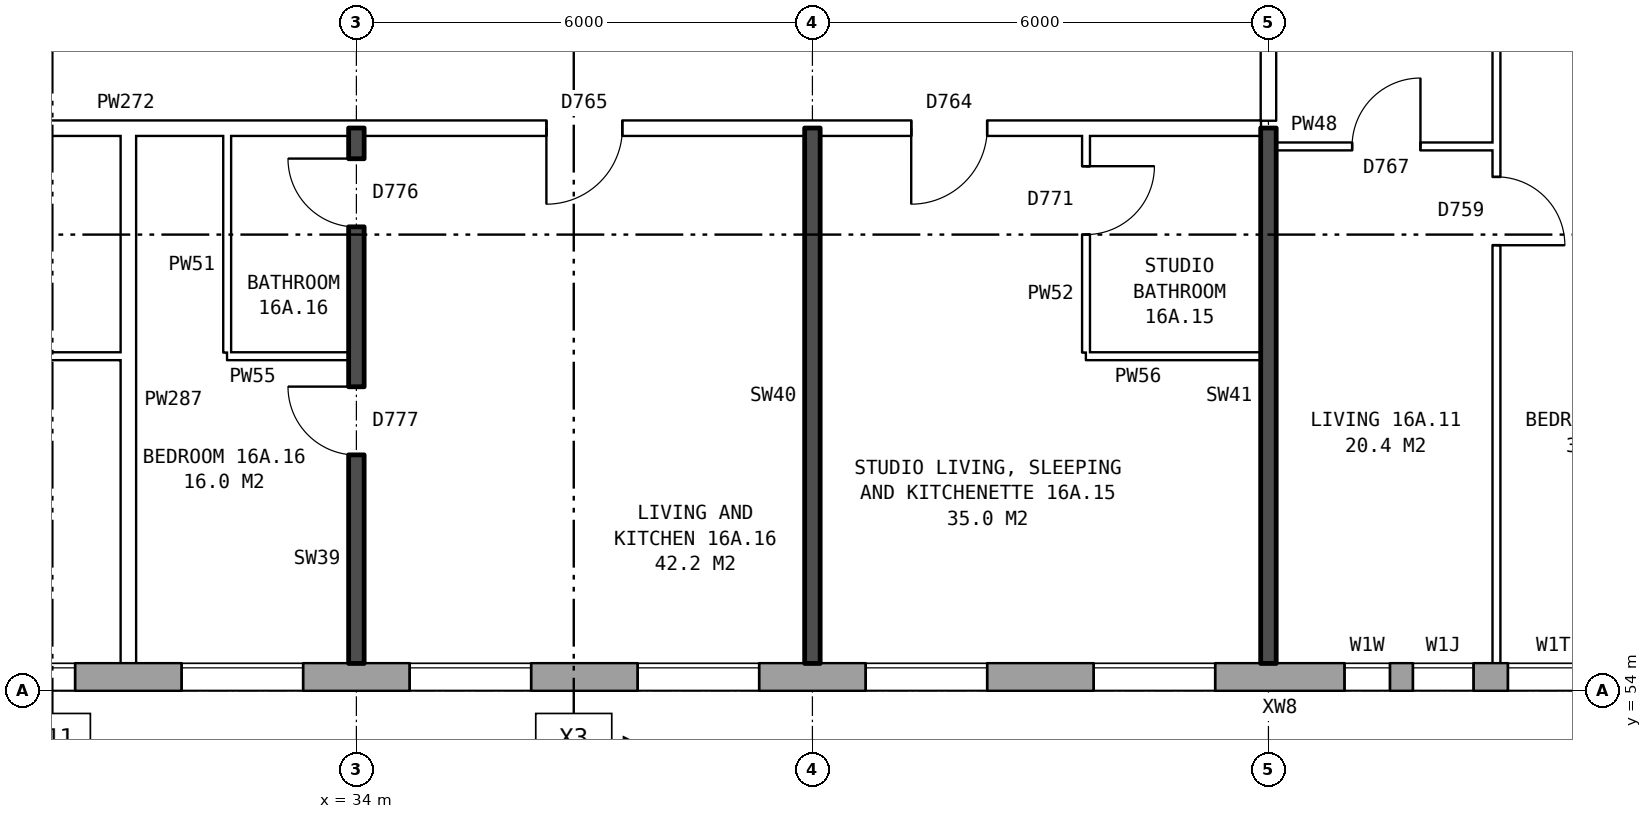
"""IFC4 building model, lengths in metres.
Left out: names, types, materials, properties, quantities, classifications, styles, units other than length and angle.
Written with IfcOpenShell. Run it as: python <this file> out.ifc"""

import sys

from ifc_helpers import new_model, si_unit, direction, frame, frame_2d, origin, place, context, subcontext, project, spatial, rectangle, extrude, element, fill, save


model = new_model("IFC4")
c1 = context("Model", 3, precision=1e-05, world=origin(), true_north=direction((0.0, 1.0)))
c2 = subcontext(c1, "Body", "Model", "MODEL_VIEW")
j1 = project(units=[si_unit("LENGTHUNIT", "METRE"), si_unit("PLANEANGLEUNIT", "RADIAN")], contexts=[c1])
p1 = place(None, origin())
s1 = spatial("IfcSite", under=j1, at=p1, CompositionType="ELEMENT")
p2 = place(p1, origin())
s2 = spatial("IfcBuilding", under=s1, at=p2, CompositionType="ELEMENT")
p3 = place(p2, frame((0.0, 0.0, 59.8)))
s3 = spatial("IfcBuildingStorey", under=s2, at=p3, CompositionType="ELEMENT", Elevation=59.8)
p4 = place(p3, frame((24.575, 54.18, 0.0), z_axis=(0.0, 0.0, 1.0), x_axis=(1.0, 0.0, 0.0)))
e1 = element("IfcWall", 1, at=p4, inside=s3, PredefinedType="STANDARD", context=c2, shape_type="SweptSolid", body=[
    extrude(rectangle(XDim=48.351, YDim=0.36, at=frame_2d((24.175, 0.0))), origin(), (0.0, 0.0, 1.0), 2.85),
])
p5 = place(p4, frame((1.125, 0.0, 0.8)))
e2 = element("IfcOpeningElement", 2, at=p5, cuts=e1, PredefinedType="OPENING", context=c2, shape_type="SweptSolid", body=[
    extrude(rectangle(XDim=1.6, YDim=1.8, at=frame_2d((0.8, 0.9))), frame((0.0, 0.19, 0.0), z_axis=(0.0, -1.0, 0.0), x_axis=(1.0, 0.0, 0.0)), (0.0, 0.0, 1.0), 0.38),
])
p6 = place(p4, frame((4.125, 0.0, 0.8)))
e3 = element("IfcOpeningElement", 3, at=p6, cuts=e1, PredefinedType="OPENING", context=c2, shape_type="SweptSolid", body=[
    extrude(rectangle(XDim=1.6, YDim=1.8, at=frame_2d((0.8, 0.9))), frame((0.0, 0.19, 0.0), z_axis=(0.0, -1.0, 0.0), x_axis=(1.0, 0.0, 0.0)), (0.0, 0.0, 1.0), 0.38),
])
p7 = place(p4, frame((7.125, 0.0, 0.8)))
e4 = element("IfcOpeningElement", 4, at=p7, cuts=e1, PredefinedType="OPENING", context=c2, shape_type="SweptSolid", body=[
    extrude(rectangle(XDim=1.6, YDim=1.8, at=frame_2d((0.8, 0.9))), frame((0.0, 0.19, 0.0), z_axis=(0.0, -1.0, 0.0), x_axis=(1.0, 0.0, 0.0)), (0.0, 0.0, 1.0), 0.38),
])
p8 = place(p4, frame((10.125, 0.0, 0.8)))
e5 = element("IfcOpeningElement", 5, at=p8, cuts=e1, PredefinedType="OPENING", context=c2, shape_type="SweptSolid", body=[
    extrude(rectangle(XDim=1.6, YDim=1.8, at=frame_2d((0.8, 0.9))), frame((0.0, 0.19, 0.0), z_axis=(0.0, -1.0, 0.0), x_axis=(1.0, 0.0, 0.0)), (0.0, 0.0, 1.0), 0.38),
])
p9 = place(p4, frame((13.125, 0.0, 0.8)))
e6 = element("IfcOpeningElement", 6, at=p9, cuts=e1, PredefinedType="OPENING", context=c2, shape_type="SweptSolid", body=[
    extrude(rectangle(XDim=1.6, YDim=1.8, at=frame_2d((0.8, 0.9))), frame((0.0, 0.19, 0.0), z_axis=(0.0, -1.0, 0.0), x_axis=(1.0, 0.0, 0.0)), (0.0, 0.0, 1.0), 0.38),
])
p10 = place(p4, frame((16.125, 0.0, 0.8)))
e7 = element("IfcOpeningElement", 7, at=p10, cuts=e1, PredefinedType="OPENING", context=c2, shape_type="SweptSolid", body=[
    extrude(rectangle(XDim=1.6, YDim=1.8, at=frame_2d((0.8, 0.9))), frame((0.0, 0.19, 0.0), z_axis=(0.0, -1.0, 0.0), x_axis=(1.0, 0.0, 0.0)), (0.0, 0.0, 1.0), 0.38),
])
p11 = place(p4, frame((19.125, 0.0, 0.8)))
e8 = element("IfcOpeningElement", 8, at=p11, cuts=e1, PredefinedType="OPENING", context=c2, shape_type="SweptSolid", body=[
    extrude(rectangle(XDim=1.6, YDim=1.8, at=frame_2d((0.8, 0.9))), frame((0.0, 0.19, 0.0), z_axis=(0.0, -1.0, 0.0), x_axis=(1.0, 0.0, 0.0)), (0.0, 0.0, 1.0), 0.38),
])
p12 = place(p4, frame((22.425, 0.0, 0.15)))
e9 = element("IfcOpeningElement", 9, at=p12, cuts=e1, PredefinedType="OPENING", context=c2, shape_type="SweptSolid", body=[
    extrude(rectangle(XDim=0.6, YDim=0.9, at=frame_2d((0.3, 0.45))), frame((0.0, 0.19, 0.0), z_axis=(0.0, -1.0, 0.0), x_axis=(1.0, 0.0, 0.0)), (0.0, 0.0, 1.0), 0.38),
])
p13 = place(p4, frame((24.575, 0.0, 0.25)))
e10 = element("IfcOpeningElement", 10, at=p13, cuts=e1, PredefinedType="OPENING", context=c2, shape_type="SweptSolid", body=[
    extrude(rectangle(XDim=1.2, YDim=0.9, at=frame_2d((0.6, 0.45))), frame((0.0, 0.19, 0.0), z_axis=(0.0, -1.0, 0.0), x_axis=(1.0, 0.0, 0.0)), (0.0, 0.0, 1.0), 0.38),
])
p14 = place(p4, frame((28.125, 0.0, 0.8)))
e11 = element("IfcOpeningElement", 11, at=p14, cuts=e1, PredefinedType="OPENING", context=c2, shape_type="SweptSolid", body=[
    extrude(rectangle(XDim=1.6, YDim=1.8, at=frame_2d((0.8, 0.9))), frame((0.0, 0.19, 0.0), z_axis=(0.0, -1.0, 0.0), x_axis=(1.0, 0.0, 0.0)), (0.0, 0.0, 1.0), 0.38),
])
p15 = place(p4, frame((31.125, 0.0, 0.8)))
e12 = element("IfcOpeningElement", 12, at=p15, cuts=e1, PredefinedType="OPENING", context=c2, shape_type="SweptSolid", body=[
    extrude(rectangle(XDim=1.6, YDim=1.8, at=frame_2d((0.8, 0.9))), frame((0.0, 0.19, 0.0), z_axis=(0.0, -1.0, 0.0), x_axis=(1.0, 0.0, 0.0)), (0.0, 0.0, 1.0), 0.38),
])
p16 = place(p4, frame((34.125, 0.0, 0.8)))
e13 = element("IfcOpeningElement", 13, at=p16, cuts=e1, PredefinedType="OPENING", context=c2, shape_type="SweptSolid", body=[
    extrude(rectangle(XDim=1.6, YDim=1.8, at=frame_2d((0.8, 0.9))), frame((0.0, 0.19, 0.0), z_axis=(0.0, -1.0, 0.0), x_axis=(1.0, 0.0, 0.0)), (0.0, 0.0, 1.0), 0.38),
])
p17 = place(p4, frame((37.125, 0.0, 0.8)))
e14 = element("IfcOpeningElement", 14, at=p17, cuts=e1, PredefinedType="OPENING", context=c2, shape_type="SweptSolid", body=[
    extrude(rectangle(XDim=1.6, YDim=1.8, at=frame_2d((0.8, 0.9))), frame((0.0, 0.19, 0.0), z_axis=(0.0, -1.0, 0.0), x_axis=(1.0, 0.0, 0.0)), (0.0, 0.0, 1.0), 0.38),
])
p18 = place(p4, frame((40.125, 0.0, 0.8)))
e15 = element("IfcOpeningElement", 15, at=p18, cuts=e1, PredefinedType="OPENING", context=c2, shape_type="SweptSolid", body=[
    extrude(rectangle(XDim=1.6, YDim=1.8, at=frame_2d((0.8, 0.9))), frame((0.0, 0.19, 0.0), z_axis=(0.0, -1.0, 0.0), x_axis=(1.0, 0.0, 0.0)), (0.0, 0.0, 1.0), 0.38),
])
p19 = place(p4, frame((43.125, 0.0, 0.8)))
e16 = element("IfcOpeningElement", 16, at=p19, cuts=e1, PredefinedType="OPENING", context=c2, shape_type="SweptSolid", body=[
    extrude(rectangle(XDim=1.6, YDim=1.8, at=frame_2d((0.8, 0.9))), frame((0.0, 0.19, 0.0), z_axis=(0.0, -1.0, 0.0), x_axis=(1.0, 0.0, 0.0)), (0.0, 0.0, 1.0), 0.38),
])
p20 = place(p4, frame((46.125, 0.0, 0.8)))
e17 = element("IfcOpeningElement", 17, at=p20, cuts=e1, PredefinedType="OPENING", context=c2, shape_type="SweptSolid", body=[
    extrude(rectangle(XDim=1.6, YDim=1.8, at=frame_2d((0.8, 0.9))), frame((0.0, 0.19, 0.0), z_axis=(0.0, -1.0, 0.0), x_axis=(1.0, 0.0, 0.0)), (0.0, 0.0, 1.0), 0.38),
])
p21 = place(p4, frame((23.325, 0.0, 0.15)))
e18 = element("IfcOpeningElement", 18, at=p21, cuts=e1, PredefinedType="OPENING", context=c2, shape_type="SweptSolid", body=[
    extrude(rectangle(XDim=0.8, YDim=1.5, at=frame_2d((0.4, 0.75))), frame((0.0, 0.19, 0.0), z_axis=(0.0, -1.0, 0.0), x_axis=(1.0, 0.0, 0.0)), (0.0, 0.0, 1.0), 0.38),
])
p22 = place(p4, frame((26.425, 0.0, 1.65)))
e19 = element("IfcOpeningElement", 19, at=p22, cuts=e1, PredefinedType="OPENING", context=c2, shape_type="SweptSolid", body=[
    extrude(rectangle(XDim=0.8, YDim=0.9, at=frame_2d((0.4, 0.45))), frame((0.0, 0.19, 0.0), z_axis=(0.0, -1.0, 0.0), x_axis=(1.0, 0.0, 0.0)), (0.0, 0.0, 1.0), 0.38),
])
p23 = place(p3, frame((28.1, 58.4, 0.0), z_axis=(0.0, 0.0, 1.0), x_axis=(1.0, 0.0, 0.0)))
e20 = element("IfcWall", 20, at=p23, inside=s3, PredefinedType="PARTITIONING", context=c2, shape_type="SweptSolid", body=[
    extrude(rectangle(XDim=2.8, YDim=0.1, at=frame_2d((1.4, 0.0))), origin(), (0.0, 0.0, 1.0), 2.85),
])
p24 = place(p3, frame((32.3, 58.4, 0.0), z_axis=(0.0, 0.0, 1.0), x_axis=(1.0, 0.0, 0.0)))
e21 = element("IfcWall", 21, at=p24, inside=s3, PredefinedType="PARTITIONING", context=c2, shape_type="SweptSolid", body=[
    extrude(rectangle(XDim=1.6, YDim=0.1, at=frame_2d((0.8, 0.0))), origin(), (0.0, 0.0, 1.0), 2.85),
])
p25 = place(p3, frame((43.6, 58.4, 0.0), z_axis=(0.0, 0.0, 1.0), x_axis=(1.0, 0.0, 0.0)))
e22 = element("IfcWall", 22, at=p25, inside=s3, PredefinedType="PARTITIONING", context=c2, shape_type="SweptSolid", body=[
    extrude(rectangle(XDim=2.3, YDim=0.1, at=frame_2d((1.15, 0.0))), origin(), (0.0, 0.0, 1.0), 2.85),
])
p26 = place(p3, frame((46.1, 61.16, 0.0), z_axis=(0.0, 0.0, 1.0), x_axis=(1.0, 0.0, 0.0)))
e23 = element("IfcWall", 23, at=p26, inside=s3, PredefinedType="PARTITIONING", context=c2, shape_type="SweptSolid", body=[
    extrude(rectangle(XDim=2.9, YDim=0.1, at=frame_2d((1.45, 0.0))), origin(), (0.0, 0.0, 1.0), 2.85),
])
p27 = place(p26, frame((1.0, 0.0, 0.0)))
e24 = element("IfcOpeningElement", 24, at=p27, cuts=e23, PredefinedType="OPENING", context=c2, shape_type="SweptSolid", body=[
    extrude(rectangle(XDim=0.9, YDim=2.1, at=frame_2d((0.45, 1.05))), frame((0.0, 0.06, 0.0), z_axis=(0.0, -1.0, 0.0), x_axis=(1.0, 0.0, 0.0)), (0.0, 0.0, 1.0), 0.12),
])
p28 = place(p3, frame((21.86, 61.4, 0.0), z_axis=(0.0, 0.0, 1.0), x_axis=(1.0, 0.0, 0.0)))
e25 = element("IfcWall", 25, at=p28, inside=s3, PredefinedType="PARTITIONING", context=c2, shape_type="SweptSolid", body=[
    extrude(rectangle(XDim=24.04, YDim=0.2, at=frame_2d((12.02, 0.0))), origin(), (0.0, 0.0, 1.0), 2.85),
])
p29 = place(p28, frame((19.44, 0.0, 0.0)))
e26 = element("IfcOpeningElement", 26, at=p29, cuts=e25, PredefinedType="OPENING", context=c2, shape_type="SweptSolid", body=[
    extrude(rectangle(XDim=1.0, YDim=2.1, at=frame_2d((0.5, 1.05))), frame((0.0, 0.11, 0.0), z_axis=(0.0, -1.0, 0.0), x_axis=(1.0, 0.0, 0.0)), (0.0, 0.0, 1.0), 0.22),
])
p30 = place(p28, frame((14.64, 0.0, 0.0)))
e27 = element("IfcOpeningElement", 27, at=p30, cuts=e25, PredefinedType="OPENING", context=c2, shape_type="SweptSolid", body=[
    extrude(rectangle(XDim=1.0, YDim=2.1, at=frame_2d((0.5, 1.05))), frame((0.0, 0.11, 0.0), z_axis=(0.0, -1.0, 0.0), x_axis=(1.0, 0.0, 0.0)), (0.0, 0.0, 1.0), 0.22),
])
p31 = place(p28, frame((2.57, 0.0, 0.0)))
e28 = element("IfcOpeningElement", 28, at=p31, cuts=e25, PredefinedType="OPENING", context=c2, shape_type="SweptSolid", body=[
    extrude(rectangle(XDim=1.0, YDim=2.1, at=frame_2d((0.5, 1.05))), frame((0.0, 0.11, 0.0), z_axis=(0.0, -1.0, 0.0), x_axis=(1.0, 0.0, 0.0)), (0.0, 0.0, 1.0), 0.22),
])
p32 = place(p3, frame((31.0, 54.36, 0.0), z_axis=(0.0, 0.0, 1.0), x_axis=(0.0, 1.0, 0.0)))
e29 = element("IfcWall", 29, at=p32, inside=s3, PredefinedType="PARTITIONING", context=c2, shape_type="SweptSolid", body=[
    extrude(rectangle(XDim=6.94, YDim=0.2, at=frame_2d((3.47, 0.0))), origin(), (0.0, 0.0, 1.0), 2.85),
])
p33 = place(p3, frame((32.3, 58.45, 0.0), z_axis=(0.0, 0.0, 1.0), x_axis=(0.0, 1.0, 0.0)))
e30 = element("IfcWall", 30, at=p33, inside=s3, PredefinedType="PARTITIONING", context=c2, shape_type="SweptSolid", body=[
    extrude(rectangle(XDim=2.85, YDim=0.1, at=frame_2d((1.425, 0.0))), origin(), (0.0, 0.0, 1.0), 2.85),
])
p34 = place(p3, frame((34.0, 54.36, 0.0), z_axis=(0.0, 0.0, 1.0), x_axis=(0.0, 1.0, 0.0)))
e31 = element("IfcWall", 31, at=p34, inside=s3, PredefinedType="SOLIDWALL", context=c2, shape_type="SweptSolid", body=[
    extrude(rectangle(XDim=7.04, YDim=0.2, at=frame_2d((3.52, 0.0))), origin(), (0.0, 0.0, 1.0), 2.85),
])
p35 = place(p34, frame((2.74, 0.0, 0.0)))
e32 = element("IfcOpeningElement", 32, at=p35, cuts=e31, PredefinedType="OPENING", context=c2, shape_type="SweptSolid", body=[
    extrude(rectangle(XDim=0.9, YDim=2.1, at=frame_2d((0.45, 1.05))), frame((0.0, 0.11, 0.0), z_axis=(0.0, -1.0, 0.0), x_axis=(1.0, 0.0, 0.0)), (0.0, 0.0, 1.0), 0.22),
])
p36 = place(p34, frame((5.74, 0.0, 0.0)))
e33 = element("IfcOpeningElement", 33, at=p36, cuts=e31, PredefinedType="OPENING", context=c2, shape_type="SweptSolid", body=[
    extrude(rectangle(XDim=0.9, YDim=2.1, at=frame_2d((0.45, 1.05))), frame((0.0, 0.11, 0.0), z_axis=(0.0, -1.0, 0.0), x_axis=(1.0, 0.0, 0.0)), (0.0, 0.0, 1.0), 0.22),
])
p37 = place(p3, frame((40.0, 54.36, 0.0), z_axis=(0.0, 0.0, 1.0), x_axis=(0.0, 1.0, 0.0)))
e34 = element("IfcWall", 34, at=p37, inside=s3, PredefinedType="SOLIDWALL", context=c2, shape_type="SweptSolid", body=[
    extrude(rectangle(XDim=7.04, YDim=0.2, at=frame_2d((3.52, 0.0))), origin(), (0.0, 0.0, 1.0), 2.85),
])
p38 = place(p3, frame((43.6, 58.45, 0.0), z_axis=(0.0, 0.0, 1.0), x_axis=(0.0, 1.0, 0.0)))
e35 = element("IfcWall", 35, at=p38, inside=s3, PredefinedType="PARTITIONING", context=c2, shape_type="SweptSolid", body=[
    extrude(rectangle(XDim=2.85, YDim=0.1, at=frame_2d((1.425, 0.0))), origin(), (0.0, 0.0, 1.0), 2.85),
])
p39 = place(p38, frame((1.55, 0.0, 0.0)))
e36 = element("IfcOpeningElement", 36, at=p39, cuts=e35, PredefinedType="OPENING", context=c2, shape_type="SweptSolid", body=[
    extrude(rectangle(XDim=0.9, YDim=2.1, at=frame_2d((0.45, 1.05))), frame((0.0, 0.06, 0.0), z_axis=(0.0, -1.0, 0.0), x_axis=(1.0, 0.0, 0.0)), (0.0, 0.0, 1.0), 0.12),
])
p40 = place(p3, frame((46.0, 54.36, 0.0), z_axis=(0.0, 0.0, 1.0), x_axis=(0.0, 1.0, 0.0)))
e37 = element("IfcWall", 37, at=p40, inside=s3, PredefinedType="SOLIDWALL", context=c2, shape_type="SweptSolid", body=[
    extrude(rectangle(XDim=7.04, YDim=0.2, at=frame_2d((3.52, 0.0))), origin(), (0.0, 0.0, 1.0), 2.85),
])
p41 = place(p3, frame((46.0, 61.5, 0.0), z_axis=(0.0, 0.0, 1.0), x_axis=(0.0, 1.0, 0.0)))
e38 = element("IfcWall", 38, at=p41, inside=s3, PredefinedType="PARTITIONING", context=c2, shape_type="SweptSolid", body=[
    extrude(rectangle(XDim=2.2, YDim=0.2, at=frame_2d((1.1, 0.0))), origin(), (0.0, 0.0, 1.0), 2.85),
])
p42 = place(p3, frame((49.0, 54.36, 0.0), z_axis=(0.0, 0.0, 1.0), x_axis=(0.0, 1.0, 0.0)))
e39 = element("IfcWall", 39, at=p42, inside=s3, PredefinedType="PARTITIONING", context=c2, shape_type="SweptSolid", body=[
    extrude(rectangle(XDim=14.34, YDim=0.1, at=frame_2d((7.17, 0.0))), origin(), (0.0, 0.0, 1.0), 2.85),
])
p43 = place(p42, frame((5.5, 0.0, 0.0)))
e40 = element("IfcOpeningElement", 40, at=p43, cuts=e39, PredefinedType="OPENING", context=c2, shape_type="SweptSolid", body=[
    extrude(rectangle(XDim=0.9, YDim=2.1, at=frame_2d((0.45, 1.05))), frame((0.0, 0.06, 0.0), z_axis=(0.0, -1.0, 0.0), x_axis=(1.0, 0.0, 0.0)), (0.0, 0.0, 1.0), 0.12),
])
p44 = place(p42, frame((13.04, 0.0, 0.0)))
e41 = element("IfcOpeningElement", 41, at=p44, cuts=e39, PredefinedType="OPENING", context=c2, shape_type="SweptSolid", body=[
    extrude(rectangle(XDim=0.9, YDim=2.1, at=frame_2d((0.45, 1.05))), frame((0.0, 0.06, 0.0), z_axis=(0.0, -1.0, 0.0), x_axis=(1.0, 0.0, 0.0)), (0.0, 0.0, 1.0), 0.12),
])
p45 = place(p6, origin())
e42 = element("IfcWindow", 42, at=p45, inside=s3, PartitioningType="SINGLE_PANEL", PredefinedType="WINDOW", context=c2, shape_type="SweptSolid", body=[
    extrude(rectangle(XDim=1.6, YDim=1.8, at=frame_2d((0.8, 0.9))), frame((0.0, 0.15, 0.0), z_axis=(0.0, -1.0, 0.0), x_axis=(1.0, 0.0, 0.0)), (0.0, 0.0, 1.0), 0.06),
])
fill(e3, e42)
p46 = place(p7, origin())
e43 = element("IfcWindow", 43, at=p46, inside=s3, PartitioningType="SINGLE_PANEL", PredefinedType="WINDOW", context=c2, shape_type="SweptSolid", body=[
    extrude(rectangle(XDim=1.6, YDim=1.8, at=frame_2d((0.8, 0.9))), frame((0.0, 0.15, 0.0), z_axis=(0.0, -1.0, 0.0), x_axis=(1.0, 0.0, 0.0)), (0.0, 0.0, 1.0), 0.06),
])
fill(e4, e43)
p47 = place(p8, origin())
e44 = element("IfcWindow", 44, at=p47, inside=s3, PartitioningType="SINGLE_PANEL", PredefinedType="WINDOW", context=c2, shape_type="SweptSolid", body=[
    extrude(rectangle(XDim=1.6, YDim=1.8, at=frame_2d((0.8, 0.9))), frame((0.0, 0.15, 0.0), z_axis=(0.0, -1.0, 0.0), x_axis=(1.0, 0.0, 0.0)), (0.0, 0.0, 1.0), 0.06),
])
fill(e5, e44)
p48 = place(p9, origin())
e45 = element("IfcWindow", 45, at=p48, inside=s3, PartitioningType="SINGLE_PANEL", PredefinedType="WINDOW", context=c2, shape_type="SweptSolid", body=[
    extrude(rectangle(XDim=1.6, YDim=1.8, at=frame_2d((0.8, 0.9))), frame((0.0, 0.15, 0.0), z_axis=(0.0, -1.0, 0.0), x_axis=(1.0, 0.0, 0.0)), (0.0, 0.0, 1.0), 0.06),
])
fill(e6, e45)
p49 = place(p10, origin())
e46 = element("IfcWindow", 46, at=p49, inside=s3, PartitioningType="SINGLE_PANEL", PredefinedType="WINDOW", context=c2, shape_type="SweptSolid", body=[
    extrude(rectangle(XDim=1.6, YDim=1.8, at=frame_2d((0.8, 0.9))), frame((0.0, 0.15, 0.0), z_axis=(0.0, -1.0, 0.0), x_axis=(1.0, 0.0, 0.0)), (0.0, 0.0, 1.0), 0.06),
])
fill(e7, e46)
p50 = place(p11, origin())
e47 = element("IfcWindow", 47, at=p50, inside=s3, PartitioningType="SINGLE_PANEL", PredefinedType="WINDOW", context=c2, shape_type="SweptSolid", body=[
    extrude(rectangle(XDim=1.6, YDim=1.8, at=frame_2d((0.8, 0.9))), frame((0.0, 0.15, 0.0), z_axis=(0.0, -1.0, 0.0), x_axis=(1.0, 0.0, 0.0)), (0.0, 0.0, 1.0), 0.06),
])
fill(e8, e47)
p51 = place(p12, origin())
e48 = element("IfcWindow", 48, at=p51, inside=s3, PartitioningType="SINGLE_PANEL", PredefinedType="WINDOW", context=c2, shape_type="SweptSolid", body=[
    extrude(rectangle(XDim=0.6, YDim=0.9, at=frame_2d((0.3, 0.45))), frame((0.0, 0.15, 0.0), z_axis=(0.0, -1.0, 0.0), x_axis=(1.0, 0.0, 0.0)), (0.0, 0.0, 1.0), 0.06),
])
fill(e9, e48)
p52 = place(p13, origin())
e49 = element("IfcWindow", 49, at=p52, inside=s3, PartitioningType="SINGLE_PANEL", PredefinedType="WINDOW", context=c2, shape_type="SweptSolid", body=[
    extrude(rectangle(XDim=1.2, YDim=0.9, at=frame_2d((0.6, 0.45))), frame((0.0, 0.15, 0.0), z_axis=(0.0, -1.0, 0.0), x_axis=(1.0, 0.0, 0.0)), (0.0, 0.0, 1.0), 0.06),
])
fill(e10, e49)
p53 = place(p43, frame((0.9, 0.0, 0.0), z_axis=(0.0, 0.0, 1.0), x_axis=(-1.0, 0.0, 0.0)))
e50 = element("IfcDoor", 50, at=p53, inside=s3, OperationType="SINGLE_SWING_RIGHT", PredefinedType="DOOR", context=c2, shape_type="SweptSolid", body=[
    extrude(rectangle(XDim=0.9, YDim=2.1, at=frame_2d((0.45, 1.05))), frame((0.0, 0.025, 0.0), z_axis=(0.0, -1.0, 0.0), x_axis=(1.0, 0.0, 0.0)), (0.0, 0.0, 1.0), 0.05),
])
fill(e40, e50)
p54 = place(p27, origin())
e51 = element("IfcDoor", 51, at=p54, inside=s3, OperationType="SINGLE_SWING_RIGHT", PredefinedType="DOOR", context=c2, shape_type="SweptSolid", body=[
    extrude(rectangle(XDim=0.9, YDim=2.1, at=frame_2d((0.45, 1.05))), frame((0.0, 0.025, 0.0), z_axis=(0.0, -1.0, 0.0), x_axis=(1.0, 0.0, 0.0)), (0.0, 0.0, 1.0), 0.05),
])
fill(e24, e51)
p55 = place(p29, frame((1.0, 0.0, 0.0), z_axis=(0.0, 0.0, 1.0), x_axis=(-1.0, 0.0, 0.0)))
e52 = element("IfcDoor", 52, at=p55, inside=s3, OperationType="SINGLE_SWING_RIGHT", PredefinedType="DOOR", context=c2, shape_type="SweptSolid", body=[
    extrude(rectangle(XDim=1.0, YDim=2.1, at=frame_2d((0.5, 1.05))), frame((0.0, 0.025, 0.0), z_axis=(0.0, -1.0, 0.0), x_axis=(1.0, 0.0, 0.0)), (0.0, 0.0, 1.0), 0.05),
])
fill(e26, e52)
p56 = place(p39, frame((0.9, 0.0, 0.0), z_axis=(0.0, 0.0, 1.0), x_axis=(-1.0, 0.0, 0.0)))
e53 = element("IfcDoor", 53, at=p56, inside=s3, OperationType="SINGLE_SWING_LEFT", PredefinedType="DOOR", context=c2, shape_type="SweptSolid", body=[
    extrude(rectangle(XDim=0.9, YDim=2.1, at=frame_2d((0.45, 1.05))), frame((0.0, 0.025, 0.0), z_axis=(0.0, -1.0, 0.0), x_axis=(1.0, 0.0, 0.0)), (0.0, 0.0, 1.0), 0.05),
])
fill(e36, e53)
p57 = place(p35, origin())
e54 = element("IfcDoor", 54, at=p57, inside=s3, OperationType="SINGLE_SWING_RIGHT", PredefinedType="DOOR", context=c2, shape_type="SweptSolid", body=[
    extrude(rectangle(XDim=0.9, YDim=2.1, at=frame_2d((0.45, 1.05))), frame((0.0, 0.025, 0.0), z_axis=(0.0, -1.0, 0.0), x_axis=(1.0, 0.0, 0.0)), (0.0, 0.0, 1.0), 0.05),
])
fill(e32, e54)
p58 = place(p30, frame((1.0, 0.0, 0.0), z_axis=(0.0, 0.0, 1.0), x_axis=(-1.0, 0.0, 0.0)))
e55 = element("IfcDoor", 55, at=p58, inside=s3, OperationType="SINGLE_SWING_RIGHT", PredefinedType="DOOR", context=c2, shape_type="SweptSolid", body=[
    extrude(rectangle(XDim=1.0, YDim=2.1, at=frame_2d((0.5, 1.05))), frame((0.0, 0.025, 0.0), z_axis=(0.0, -1.0, 0.0), x_axis=(1.0, 0.0, 0.0)), (0.0, 0.0, 1.0), 0.05),
])
fill(e27, e55)
p59 = place(p36, origin())
e56 = element("IfcDoor", 56, at=p59, inside=s3, OperationType="SINGLE_SWING_RIGHT", PredefinedType="DOOR", context=c2, shape_type="SweptSolid", body=[
    extrude(rectangle(XDim=0.9, YDim=2.1, at=frame_2d((0.45, 1.05))), frame((0.0, 0.025, 0.0), z_axis=(0.0, -1.0, 0.0), x_axis=(1.0, 0.0, 0.0)), (0.0, 0.0, 1.0), 0.05),
])
fill(e33, e56)
p60 = place(p21, origin())
e57 = element("IfcWindow", 57, at=p60, inside=s3, PartitioningType="SINGLE_PANEL", PredefinedType="WINDOW", context=c2, shape_type="SweptSolid", body=[
    extrude(rectangle(XDim=0.8, YDim=1.5, at=frame_2d((0.4, 0.75))), frame((0.0, 0.15, 0.0), z_axis=(0.0, -1.0, 0.0), x_axis=(1.0, 0.0, 0.0)), (0.0, 0.0, 1.0), 0.06),
])
fill(e18, e57)
save(model, sys.argv[1])
